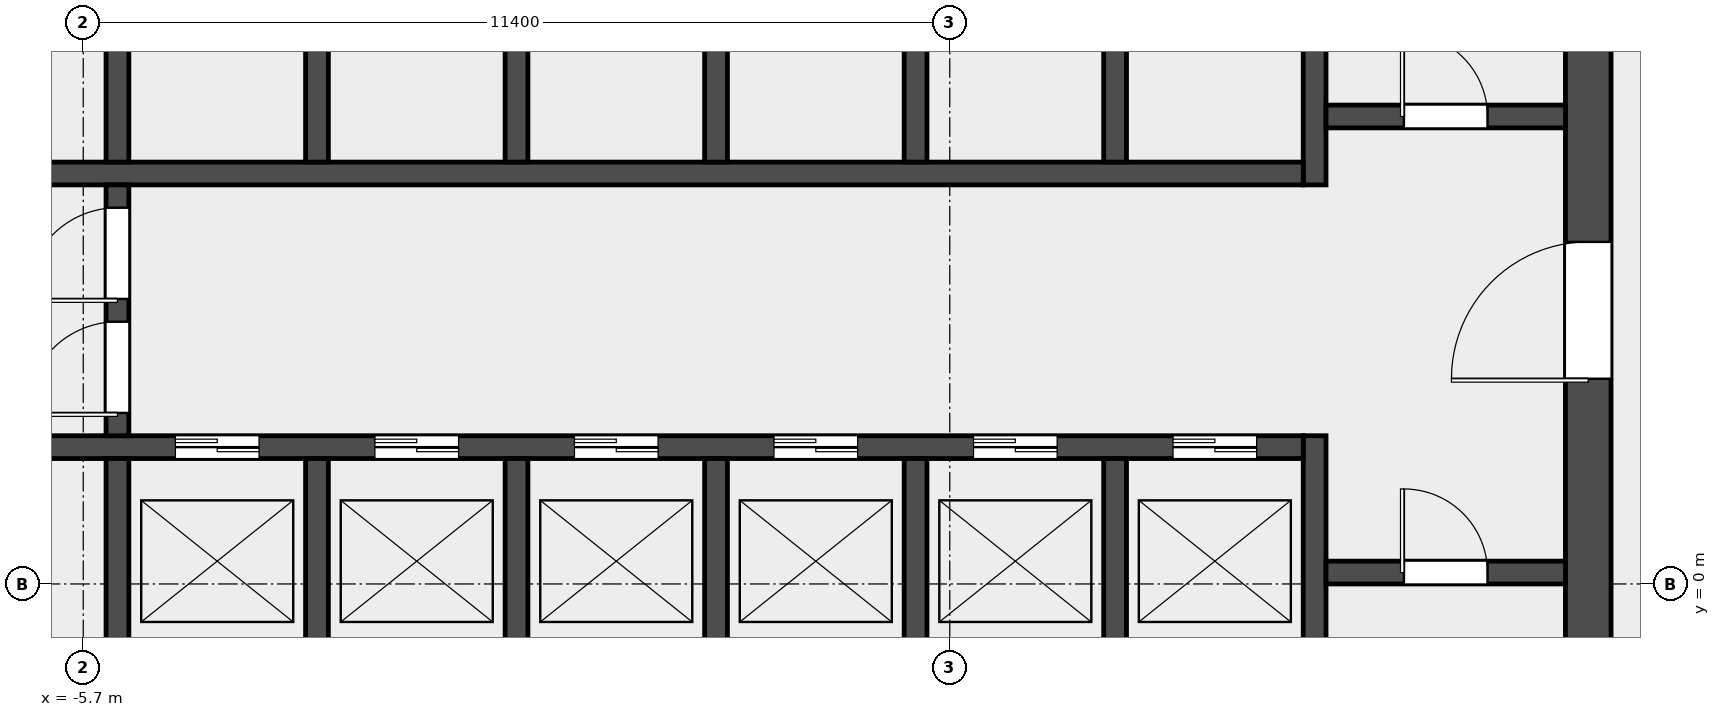
"""IFC4 building model, lengths in metres.
Left out: names, types, materials, properties, quantities, classifications, styles, units other than length and angle.
Written with IfcOpenShell. Run it as: python <this file> out.ifc"""

import sys

from ifc_helpers import new_model, si_unit, direction, frame, frame_2d, origin, place, context, subcontext, project, spatial, rectangle, extrude, element, fill, save


model = new_model("IFC4")
c1 = context("Model", 3, precision=1e-05, world=origin(), true_north=direction((0.0, 1.0)))
c2 = subcontext(c1, "Body", "Model", "MODEL_VIEW")
j1 = project(units=[si_unit("LENGTHUNIT", "METRE"), si_unit("PLANEANGLEUNIT", "RADIAN")], contexts=[c1])
p1 = place(None, origin())
s1 = spatial("IfcSite", under=j1, at=p1, CompositionType="ELEMENT")
p2 = place(p1, origin())
s2 = spatial("IfcBuilding", under=s1, at=p2, CompositionType="ELEMENT")
p3 = place(p2, frame((0.0, 0.0, 193.0)))
s3 = spatial("IfcBuildingStorey", under=s2, at=p3, CompositionType="ELEMENT", Elevation=193.0)
p4 = place(p3, frame((14.1, -6.6, 0.0), z_axis=(0.0, 0.0, 1.0), x_axis=(0.0, 1.0, 0.0)))
e1 = element("IfcWall", 1, at=p4, inside=s3, PredefinedType="SHEAR", context=c2, shape_type="SweptSolid", body=[
    extrude(rectangle(XDim=19.5, YDim=0.6, at=frame_2d((9.75, 0.0))), origin(), (0.0, 0.0, 1.0), 3.7),
])
p5 = place(p4, frame((9.3, 0.0, 0.0)))
e2 = element("IfcOpeningElement", 2, at=p5, cuts=e1, PredefinedType="OPENING", context=c2, shape_type="SweptSolid", body=[
    extrude(rectangle(XDim=1.8, YDim=2.1, at=frame_2d((0.9, 1.05))), frame((0.0, 0.312, 0.0), z_axis=(0.0, -1.0, 0.0), x_axis=(1.0, 0.0, 0.0)), (0.0, 0.0, 1.0), 0.624),
])
p6 = place(p3, frame((10.5, -6.6, 0.0), z_axis=(0.0, 0.0, 1.0), x_axis=(0.0, 1.0, 0.0)))
e3 = element("IfcWall", 3, at=p6, inside=s3, PredefinedType="SHEAR", context=c2, shape_type="SweptSolid", body=[
    extrude(rectangle(XDim=8.55, YDim=0.3, at=frame_2d((4.275, 0.0))), origin(), (0.0, 0.0, 1.0), 3.7),
])
p7 = place(p3, frame((10.5, 5.25, 0.0), z_axis=(0.0, 0.0, 1.0), x_axis=(0.0, 1.0, 0.0)))
e4 = element("IfcWall", 4, at=p7, inside=s3, PredefinedType="SHEAR", context=c2, shape_type="SweptSolid", body=[
    extrude(rectangle(XDim=7.65, YDim=0.3, at=frame_2d((3.825, 0.0))), origin(), (0.0, 0.0, 1.0), 3.7),
])
p8 = place(p3, frame((10.65, 0.15, 0.0), z_axis=(0.0, 0.0, 1.0), x_axis=(1.0, 0.0, 0.0)))
e5 = element("IfcWall", 5, at=p8, inside=s3, PredefinedType="SOLIDWALL", context=c2, shape_type="SweptSolid", body=[
    extrude(rectangle(XDim=3.15, YDim=0.3, at=frame_2d((1.575, 0.0))), origin(), (0.0, 0.0, 1.0), 3.7),
])
p9 = place(p8, frame((1.025, 0.0, 0.0)))
e6 = element("IfcOpeningElement", 6, at=p9, cuts=e5, PredefinedType="OPENING", context=c2, shape_type="SweptSolid", body=[
    extrude(rectangle(XDim=1.1, YDim=2.1, at=frame_2d((0.55, 1.05))), frame((0.0, 0.162, 0.0), z_axis=(0.0, -1.0, 0.0), x_axis=(1.0, 0.0, 0.0)), (0.0, 0.0, 1.0), 0.324),
])
p10 = place(p3, frame((10.65, 6.15, 0.0), z_axis=(0.0, 0.0, 1.0), x_axis=(1.0, 0.0, 0.0)))
e7 = element("IfcWall", 7, at=p10, inside=s3, PredefinedType="SOLIDWALL", context=c2, shape_type="SweptSolid", body=[
    extrude(rectangle(XDim=3.15, YDim=0.3, at=frame_2d((1.575, 0.0))), origin(), (0.0, 0.0, 1.0), 3.7),
])
p11 = place(p10, frame((1.025, 0.0, 0.0)))
e8 = element("IfcOpeningElement", 8, at=p11, cuts=e7, PredefinedType="OPENING", context=c2, shape_type="SweptSolid", body=[
    extrude(rectangle(XDim=1.1, YDim=2.1, at=frame_2d((0.55, 1.05))), frame((0.0, 0.162, 0.0), z_axis=(0.0, -1.0, 0.0), x_axis=(1.0, 0.0, 0.0)), (0.0, 0.0, 1.0), 0.324),
])
p12 = place(p3, frame((-10.35, 1.8, 0.0), z_axis=(0.0, 0.0, 1.0), x_axis=(1.0, 0.0, 0.0)))
e9 = element("IfcWall", 9, at=p12, inside=s3, PredefinedType="SOLIDWALL", context=c2, shape_type="SweptSolid", body=[
    extrude(rectangle(XDim=20.7, YDim=0.3, at=frame_2d((10.35, 0.0))), origin(), (0.0, 0.0, 1.0), 3.7),
])
p13 = place(p12, frame((0.512, 0.0, 0.0)))
e10 = element("IfcOpeningElement", 10, at=p13, cuts=e9, PredefinedType="OPENING", context=c2, shape_type="SweptSolid", body=[
    extrude(rectangle(XDim=1.3, YDim=2.1, at=frame_2d((0.65, 1.05))), frame((0.0, 0.162, 0.0), z_axis=(0.0, -1.0, 0.0), x_axis=(1.0, 0.0, 0.0)), (0.0, 0.0, 1.0), 0.324),
])
p14 = place(p12, frame((5.863, 0.0, 0.0)))
e11 = element("IfcOpeningElement", 11, at=p14, cuts=e9, PredefinedType="OPENING", context=c2, shape_type="SweptSolid", body=[
    extrude(rectangle(XDim=1.1, YDim=2.1, at=frame_2d((0.55, 1.05))), frame((0.0, 0.162, 0.0), z_axis=(0.0, -1.0, 0.0), x_axis=(1.0, 0.0, 0.0)), (0.0, 0.0, 1.0), 0.324),
])
p15 = place(p12, frame((8.488, 0.0, 0.0)))
e12 = element("IfcOpeningElement", 12, at=p15, cuts=e9, PredefinedType="OPENING", context=c2, shape_type="SweptSolid", body=[
    extrude(rectangle(XDim=1.1, YDim=2.1, at=frame_2d((0.55, 1.05))), frame((0.0, 0.162, 0.0), z_axis=(0.0, -1.0, 0.0), x_axis=(1.0, 0.0, 0.0)), (0.0, 0.0, 1.0), 0.324),
])
p16 = place(p12, frame((11.113, 0.0, 0.0)))
e13 = element("IfcOpeningElement", 13, at=p16, cuts=e9, PredefinedType="OPENING", context=c2, shape_type="SweptSolid", body=[
    extrude(rectangle(XDim=1.1, YDim=2.1, at=frame_2d((0.55, 1.05))), frame((0.0, 0.162, 0.0), z_axis=(0.0, -1.0, 0.0), x_axis=(1.0, 0.0, 0.0)), (0.0, 0.0, 1.0), 0.324),
])
p17 = place(p12, frame((13.738, 0.0, 0.0)))
e14 = element("IfcOpeningElement", 14, at=p17, cuts=e9, PredefinedType="OPENING", context=c2, shape_type="SweptSolid", body=[
    extrude(rectangle(XDim=1.1, YDim=2.1, at=frame_2d((0.55, 1.05))), frame((0.0, 0.162, 0.0), z_axis=(0.0, -1.0, 0.0), x_axis=(1.0, 0.0, 0.0)), (0.0, 0.0, 1.0), 0.324),
])
p18 = place(p12, frame((16.363, 0.0, 0.0)))
e15 = element("IfcOpeningElement", 15, at=p18, cuts=e9, PredefinedType="OPENING", context=c2, shape_type="SweptSolid", body=[
    extrude(rectangle(XDim=1.1, YDim=2.1, at=frame_2d((0.55, 1.05))), frame((0.0, 0.162, 0.0), z_axis=(0.0, -1.0, 0.0), x_axis=(1.0, 0.0, 0.0)), (0.0, 0.0, 1.0), 0.324),
])
p19 = place(p12, frame((18.988, 0.0, 0.0)))
e16 = element("IfcOpeningElement", 16, at=p19, cuts=e9, PredefinedType="OPENING", context=c2, shape_type="SweptSolid", body=[
    extrude(rectangle(XDim=1.1, YDim=2.1, at=frame_2d((0.55, 1.05))), frame((0.0, 0.162, 0.0), z_axis=(0.0, -1.0, 0.0), x_axis=(1.0, 0.0, 0.0)), (0.0, 0.0, 1.0), 0.324),
])
p20 = place(p3, frame((-10.35, 5.4, 0.0), z_axis=(0.0, 0.0, 1.0), x_axis=(1.0, 0.0, 0.0)))
e17 = element("IfcWall", 17, at=p20, inside=s3, PredefinedType="SOLIDWALL", context=c2, shape_type="SweptSolid", body=[
    extrude(rectangle(XDim=20.7, YDim=0.3, at=frame_2d((10.35, 0.0))), origin(), (0.0, 0.0, 1.0), 3.7),
])
p21 = place(p20, frame((0.512, 0.0, 0.0)))
e18 = element("IfcOpeningElement", 18, at=p21, cuts=e17, PredefinedType="OPENING", context=c2, shape_type="SweptSolid", body=[
    extrude(rectangle(XDim=1.3, YDim=2.1, at=frame_2d((0.65, 1.05))), frame((0.0, 0.162, 0.0), z_axis=(0.0, -1.0, 0.0), x_axis=(1.0, 0.0, 0.0)), (0.0, 0.0, 1.0), 0.324),
])
for number, where, z_axis, x_axis in (
    (19, (-5.25, -1.05, 0.0), (0.0, 0.0, 1.0), (0.0, 1.0, 0.0)),
    (20, (-2.625, -1.05, 0.0), (0.0, 0.0, 1.0), (0.0, 1.0, 0.0)),
    (21, (0.0, -1.05, 0.0), (0.0, 0.0, 1.0), (0.0, 1.0, 0.0)),
    (22, (2.625, -1.05, 0.0), (0.0, 0.0, 1.0), (0.0, 1.0, 0.0)),
    (23, (5.25, -1.05, 0.0), (0.0, 0.0, 1.0), (0.0, 1.0, 0.0)),
    (24, (7.875, -1.05, 0.0), (0.0, 0.0, 1.0), (0.0, 1.0, 0.0)),
    (25, (-5.25, 5.55, 0.0), (0.0, 0.0, 1.0), (0.0, 1.0, 0.0)),
    (26, (-2.625, 5.55, 0.0), (0.0, 0.0, 1.0), (0.0, 1.0, 0.0)),
    (27, (0.0, 5.55, 0.0), (0.0, 0.0, 1.0), (0.0, 1.0, 0.0)),
    (28, (2.625, 5.55, 0.0), (0.0, 0.0, 1.0), (0.0, 1.0, 0.0)),
    (29, (5.25, 5.55, 0.0), (0.0, 0.0, 1.0), (0.0, 1.0, 0.0)),
    (30, (7.875, 5.55, 0.0), (0.0, 0.0, 1.0), (0.0, 1.0, 0.0)),
):
    element("IfcWall", number, at=place(p3, frame(where, z_axis=z_axis, x_axis=x_axis)), inside=s3, PredefinedType="SOLIDWALL", context=c2, shape_type="SweptSolid", body=[
        extrude(rectangle(XDim=2.7, YDim=0.3, at=frame_2d((1.35, 0.0))), origin(), (0.0, 0.0, 1.0), 3.7),
    ])
p22 = place(p3, frame((-5.25, 1.95, 0.0), z_axis=(0.0, 0.0, 1.0), x_axis=(0.0, 1.0, 0.0)))
e31 = element("IfcWall", 31, at=p22, inside=s3, PredefinedType="SOLIDWALL", context=c2, shape_type="SweptSolid", body=[
    extrude(rectangle(XDim=3.3, YDim=0.3, at=frame_2d((1.65, 0.0))), origin(), (0.0, 0.0, 1.0), 3.7),
])
p23 = place(p22, frame((0.3, 0.0, 0.0)))
e32 = element("IfcOpeningElement", 32, at=p23, cuts=e31, PredefinedType="OPENING", context=c2, shape_type="SweptSolid", body=[
    extrude(rectangle(XDim=1.2, YDim=2.1, at=frame_2d((0.6, 1.05))), frame((0.0, 0.162, 0.0), z_axis=(0.0, -1.0, 0.0), x_axis=(1.0, 0.0, 0.0)), (0.0, 0.0, 1.0), 0.324),
])
p24 = place(p22, frame((1.8, 0.0, 0.0)))
e33 = element("IfcOpeningElement", 33, at=p24, cuts=e31, PredefinedType="OPENING", context=c2, shape_type="SweptSolid", body=[
    extrude(rectangle(XDim=1.2, YDim=2.1, at=frame_2d((0.6, 1.05))), frame((0.0, 0.162, 0.0), z_axis=(0.0, -1.0, 0.0), x_axis=(1.0, 0.0, 0.0)), (0.0, 0.0, 1.0), 0.324),
])
p25 = place(p9, origin())
e34 = element("IfcDoor", 34, at=p25, inside=s3, OperationType="SINGLE_SWING_RIGHT", PredefinedType="DOOR", context=c2, shape_type="SweptSolid", body=[
    extrude(rectangle(XDim=1.1, YDim=2.1, at=frame_2d((0.55, 1.05))), frame((0.0, 0.025, 0.0), z_axis=(0.0, -1.0, 0.0), x_axis=(1.0, 0.0, 0.0)), (0.0, 0.0, 1.0), 0.05),
])
fill(e6, e34)
p26 = place(p11, origin())
e35 = element("IfcDoor", 35, at=p26, inside=s3, OperationType="SINGLE_SWING_RIGHT", PredefinedType="DOOR", context=c2, shape_type="SweptSolid", body=[
    extrude(rectangle(XDim=1.1, YDim=2.1, at=frame_2d((0.55, 1.05))), frame((0.0, 0.025, 0.0), z_axis=(0.0, -1.0, 0.0), x_axis=(1.0, 0.0, 0.0)), (0.0, 0.0, 1.0), 0.05),
])
fill(e8, e35)
p27 = place(p5, origin())
e36 = element("IfcDoor", 36, at=p27, inside=s3, OperationType="DOUBLE_DOOR_SINGLE_SWING", PredefinedType="DOOR", context=c2, shape_type="SweptSolid", body=[
    extrude(rectangle(XDim=1.8, YDim=2.1, at=frame_2d((0.9, 1.05))), frame((0.0, 0.025, 0.0), z_axis=(0.0, -1.0, 0.0), x_axis=(1.0, 0.0, 0.0)), (0.0, 0.0, 1.0), 0.05),
])
fill(e2, e36)
p28 = place(p23, origin())
e37 = element("IfcDoor", 37, at=p28, inside=s3, OperationType="SINGLE_SWING_LEFT", PredefinedType="DOOR", context=c2, shape_type="SweptSolid", body=[
    extrude(rectangle(XDim=1.2, YDim=2.1, at=frame_2d((0.6, 1.05))), frame((0.0, 0.025, 0.0), z_axis=(0.0, -1.0, 0.0), x_axis=(1.0, 0.0, 0.0)), (0.0, 0.0, 1.0), 0.05),
])
fill(e32, e37)
p29 = place(p24, origin())
e38 = element("IfcDoor", 38, at=p29, inside=s3, OperationType="SINGLE_SWING_RIGHT", PredefinedType="DOOR", context=c2, shape_type="SweptSolid", body=[
    extrude(rectangle(XDim=1.2, YDim=2.1, at=frame_2d((0.6, 1.05))), frame((0.0, 0.025, 0.0), z_axis=(0.0, -1.0, 0.0), x_axis=(1.0, 0.0, 0.0)), (0.0, 0.0, 1.0), 0.05),
])
fill(e33, e38)
p30 = place(p14, origin())
e39 = element("IfcDoor", 39, at=p30, inside=s3, OperationType="DOUBLE_DOOR_SLIDING", PredefinedType="DOOR", context=c2, shape_type="SweptSolid", body=[
    extrude(rectangle(XDim=1.1, YDim=2.1, at=frame_2d((0.55, 1.05))), frame((0.0, 0.025, 0.0), z_axis=(0.0, -1.0, 0.0), x_axis=(1.0, 0.0, 0.0)), (0.0, 0.0, 1.0), 0.05),
])
fill(e11, e39)
p31 = place(p15, origin())
e40 = element("IfcDoor", 40, at=p31, inside=s3, OperationType="DOUBLE_DOOR_SLIDING", PredefinedType="DOOR", context=c2, shape_type="SweptSolid", body=[
    extrude(rectangle(XDim=1.1, YDim=2.1, at=frame_2d((0.55, 1.05))), frame((0.0, 0.025, 0.0), z_axis=(0.0, -1.0, 0.0), x_axis=(1.0, 0.0, 0.0)), (0.0, 0.0, 1.0), 0.05),
])
fill(e12, e40)
p32 = place(p16, origin())
e41 = element("IfcDoor", 41, at=p32, inside=s3, OperationType="DOUBLE_DOOR_SLIDING", PredefinedType="DOOR", context=c2, shape_type="SweptSolid", body=[
    extrude(rectangle(XDim=1.1, YDim=2.1, at=frame_2d((0.55, 1.05))), frame((0.0, 0.025, 0.0), z_axis=(0.0, -1.0, 0.0), x_axis=(1.0, 0.0, 0.0)), (0.0, 0.0, 1.0), 0.05),
])
fill(e13, e41)
p33 = place(p17, origin())
e42 = element("IfcDoor", 42, at=p33, inside=s3, OperationType="DOUBLE_DOOR_SLIDING", PredefinedType="DOOR", context=c2, shape_type="SweptSolid", body=[
    extrude(rectangle(XDim=1.1, YDim=2.1, at=frame_2d((0.55, 1.05))), frame((0.0, 0.025, 0.0), z_axis=(0.0, -1.0, 0.0), x_axis=(1.0, 0.0, 0.0)), (0.0, 0.0, 1.0), 0.05),
])
fill(e14, e42)
p34 = place(p18, origin())
e43 = element("IfcDoor", 43, at=p34, inside=s3, OperationType="DOUBLE_DOOR_SLIDING", PredefinedType="DOOR", context=c2, shape_type="SweptSolid", body=[
    extrude(rectangle(XDim=1.1, YDim=2.1, at=frame_2d((0.55, 1.05))), frame((0.0, 0.025, 0.0), z_axis=(0.0, -1.0, 0.0), x_axis=(1.0, 0.0, 0.0)), (0.0, 0.0, 1.0), 0.05),
])
fill(e15, e43)
p35 = place(p19, origin())
e44 = element("IfcDoor", 44, at=p35, inside=s3, OperationType="DOUBLE_DOOR_SLIDING", PredefinedType="DOOR", context=c2, shape_type="SweptSolid", body=[
    extrude(rectangle(XDim=1.1, YDim=2.1, at=frame_2d((0.55, 1.05))), frame((0.0, 0.025, 0.0), z_axis=(0.0, -1.0, 0.0), x_axis=(1.0, 0.0, 0.0)), (0.0, 0.0, 1.0), 0.05),
])
fill(e16, e44)
save(model, sys.argv[1])
